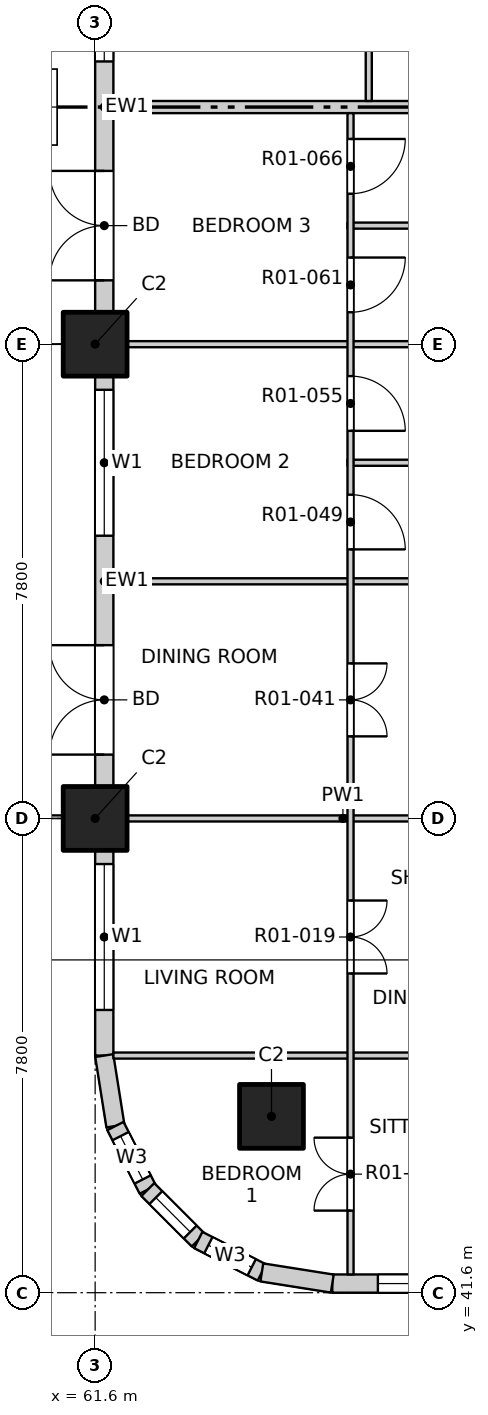
"""IFC4 building model, lengths in metres.
Left out: names, types, materials, properties, quantities, classifications, styles, units other than length and angle.
Written with IfcOpenShell. Run it as: python <this file> out.ifc"""

import sys

from ifc_helpers import new_model, si_unit, direction, frame, frame_2d, origin, origin_2d, place, context, subcontext, project, spatial, rectangle, extrude, element, fill, save


model = new_model("IFC4")
c1 = context("Model", 3, precision=1e-05, world=origin(), true_north=direction((0.0, 1.0)))
c2 = subcontext(c1, "Body", "Model", "MODEL_VIEW")
j1 = project(units=[si_unit("LENGTHUNIT", "METRE"), si_unit("PLANEANGLEUNIT", "RADIAN")], contexts=[c1])
p1 = place(None, origin())
s1 = spatial("IfcSite", under=j1, at=p1, CompositionType="ELEMENT")
p2 = place(p1, origin())
s2 = spatial("IfcBuilding", under=s1, at=p2, CompositionType="ELEMENT")
p3 = place(p2, frame((0.0, 0.0, 19.5)))
s3 = spatial("IfcBuildingStorey", under=s2, at=p3, CompositionType="ELEMENT", Elevation=19.5)
for number, where, z_axis, x_axis in (
    (1, (64.5, 44.5, -0.25), (0.0, 0.0, 1.0), (1.0, 0.0, 0.0)),
    (2, (61.6, 49.4, -0.25), (0.0, 0.0, 1.0), (1.0, 0.0, 0.0)),
    (3, (61.6, 57.2, -0.25), (0.0, 0.0, 1.0), (1.0, 0.0, 0.0)),
):
    element("IfcColumn", number, at=place(p3, frame(where, z_axis=z_axis, x_axis=x_axis)), inside=s3, PredefinedType="COLUMN", context=c2, shape_type="SweptSolid", body=[
        extrude(rectangle(XDim=1.05, YDim=1.05, at=origin_2d()), origin(), (0.0, 0.0, 1.0), 3.4),
    ])
p4 = place(p3, frame((65.5, 41.75, 0.0), z_axis=(0.0, 0.0, 1.0), x_axis=(1.0, 0.0, 0.0)))
e4 = element("IfcWall", 4, at=p4, inside=s3, PredefinedType="SOLIDWALL", context=c2, shape_type="SweptSolid", body=[
    extrude(rectangle(XDim=3.375, YDim=0.3, at=frame_2d((1.688, 0.0))), origin(), (0.0, 0.0, 1.0), 2.7),
])
p5 = place(p4, frame((0.75, 0.0, 0.9)))
e5 = element("IfcOpeningElement", 5, at=p5, cuts=e4, PredefinedType="OPENING", context=c2, shape_type="SweptSolid", body=[
    extrude(rectangle(XDim=2.4, YDim=1.8, at=frame_2d((1.2, 0.9))), frame((0.0, 0.16, 0.0), z_axis=(0.0, -1.0, 0.0), x_axis=(1.0, 0.0, 0.0)), (0.0, 0.0, 1.0), 0.32),
])
p6 = place(p3, frame((61.75, 45.5, 0.0), z_axis=(0.0, 0.0, 1.0), x_axis=(0.0, 1.0, 0.0)))
e6 = element("IfcWall", 6, at=p6, inside=s3, PredefinedType="SOLIDWALL", context=c2, shape_type="SweptSolid", body=[
    extrude(rectangle(XDim=3.375, YDim=0.3, at=frame_2d((1.688, 0.0))), origin(), (0.0, 0.0, 1.0), 2.7),
])
p7 = place(p6, frame((0.75, 0.0, 0.9)))
e7 = element("IfcOpeningElement", 7, at=p7, cuts=e6, PredefinedType="OPENING", context=c2, shape_type="SweptSolid", body=[
    extrude(rectangle(XDim=2.4, YDim=1.8, at=frame_2d((1.2, 0.9))), frame((0.0, 0.16, 0.0), z_axis=(0.0, -1.0, 0.0), x_axis=(1.0, 0.0, 0.0)), (0.0, 0.0, 1.0), 0.32),
])
p8 = place(p3, frame((61.75, 49.925, 0.0), z_axis=(0.0, 0.0, 1.0), x_axis=(0.0, 1.0, 0.0)))
e8 = element("IfcWall", 8, at=p8, inside=s3, PredefinedType="SOLIDWALL", context=c2, shape_type="SweptSolid", body=[
    extrude(rectangle(XDim=6.75, YDim=0.3, at=frame_2d((3.375, 0.0))), origin(), (0.0, 0.0, 1.0), 2.7),
])
p9 = place(p8, frame((0.525, 0.0, 0.0)))
e9 = element("IfcOpeningElement", 9, at=p9, cuts=e8, PredefinedType="OPENING", context=c2, shape_type="SweptSolid", body=[
    extrude(rectangle(XDim=1.8, YDim=2.4, at=frame_2d((0.9, 1.2))), frame((0.0, 0.16, 0.0), z_axis=(0.0, -1.0, 0.0), x_axis=(1.0, 0.0, 0.0)), (0.0, 0.0, 1.0), 0.32),
])
p10 = place(p8, frame((4.125, 0.0, 0.9)))
e10 = element("IfcOpeningElement", 10, at=p10, cuts=e8, PredefinedType="OPENING", context=c2, shape_type="SweptSolid", body=[
    extrude(rectangle(XDim=2.4, YDim=1.8, at=frame_2d((1.2, 0.9))), frame((0.0, 0.16, 0.0), z_axis=(0.0, -1.0, 0.0), x_axis=(1.0, 0.0, 0.0)), (0.0, 0.0, 1.0), 0.32),
])
p11 = place(p3, frame((61.75, 57.725, 0.0), z_axis=(0.0, 0.0, 1.0), x_axis=(0.0, 1.0, 0.0)))
e11 = element("IfcWall", 11, at=p11, inside=s3, PredefinedType="SOLIDWALL", context=c2, shape_type="SweptSolid", body=[
    extrude(rectangle(XDim=6.75, YDim=0.3, at=frame_2d((3.375, 0.0))), origin(), (0.0, 0.0, 1.0), 2.7),
])
p12 = place(p11, frame((0.525, 0.0, 0.0)))
e12 = element("IfcOpeningElement", 12, at=p12, cuts=e11, PredefinedType="OPENING", context=c2, shape_type="SweptSolid", body=[
    extrude(rectangle(XDim=1.8, YDim=2.4, at=frame_2d((0.9, 1.2))), frame((0.0, 0.16, 0.0), z_axis=(0.0, -1.0, 0.0), x_axis=(1.0, 0.0, 0.0)), (0.0, 0.0, 1.0), 0.32),
])
p13 = place(p11, frame((4.125, 0.0, 0.9)))
e13 = element("IfcOpeningElement", 13, at=p13, cuts=e11, PredefinedType="OPENING", context=c2, shape_type="SweptSolid", body=[
    extrude(rectangle(XDim=2.4, YDim=1.8, at=frame_2d((1.2, 0.9))), frame((0.0, 0.16, 0.0), z_axis=(0.0, -1.0, 0.0), x_axis=(1.0, 0.0, 0.0)), (0.0, 0.0, 1.0), 0.32),
])
p14 = place(p3, frame((61.75, 45.5, 0.0), z_axis=(0.0, 0.0, 1.0), x_axis=(0.156496880861, -0.987678452879, 0.0)))
e14 = element("IfcWall", 14, at=p14, inside=s3, PredefinedType="SOLIDWALL", context=c2, shape_type="SweptSolid", body=[
    extrude(rectangle(XDim=1.173, YDim=0.3, at=frame_2d((0.586, 0.0))), origin(), (0.0, 0.0, 1.0), 2.7),
])
p15 = place(p3, frame((61.934, 44.341, 0.0), z_axis=(0.0, 0.0, 1.0), x_axis=(0.454025524128, -0.890988677504, 0.0)))
e15 = element("IfcWall", 15, at=p15, inside=s3, PredefinedType="SOLIDWALL", context=c2, shape_type="SweptSolid", body=[
    extrude(rectangle(XDim=1.173, YDim=0.3, at=frame_2d((0.587, 0.0))), origin(), (0.0, 0.0, 1.0), 2.7),
])
p16 = place(p15, frame((0.187, 0.0, 0.9)))
e16 = element("IfcOpeningElement", 16, at=p16, cuts=e15, PredefinedType="OPENING", context=c2, shape_type="SweptSolid", body=[
    extrude(rectangle(XDim=0.8, YDim=1.2, at=frame_2d((0.4, 0.6))), frame((0.0, 0.16, 0.0), z_axis=(0.0, -1.0, 0.0), x_axis=(1.0, 0.0, 0.0)), (0.0, 0.0, 1.0), 0.32),
])
p17 = place(p3, frame((62.466, 43.296, 0.0), z_axis=(0.0, 0.0, 1.0), x_axis=(0.707106781187, -0.707106781187, 0.0)))
e17 = element("IfcWall", 17, at=p17, inside=s3, PredefinedType="SOLIDWALL", context=c2, shape_type="SweptSolid", body=[
    extrude(rectangle(XDim=1.173, YDim=0.3, at=frame_2d((0.586, 0.0))), origin(), (0.0, 0.0, 1.0), 2.7),
])
p18 = place(p17, frame((0.187, 0.0, 0.9)))
e18 = element("IfcOpeningElement", 18, at=p18, cuts=e17, PredefinedType="OPENING", context=c2, shape_type="SweptSolid", body=[
    extrude(rectangle(XDim=0.8, YDim=1.2, at=frame_2d((0.4, 0.6))), frame((0.0, 0.16, 0.0), z_axis=(0.0, -1.0, 0.0), x_axis=(1.0, 0.0, 0.0)), (0.0, 0.0, 1.0), 0.32),
])
p19 = place(p3, frame((63.296, 42.466, 0.0), z_axis=(0.0, 0.0, 1.0), x_axis=(0.890988677504, -0.454025524128, 0.0)))
e19 = element("IfcWall", 19, at=p19, inside=s3, PredefinedType="SOLIDWALL", context=c2, shape_type="SweptSolid", body=[
    extrude(rectangle(XDim=1.173, YDim=0.3, at=frame_2d((0.587, 0.0))), origin(), (0.0, 0.0, 1.0), 2.7),
])
p20 = place(p19, frame((0.187, 0.0, 0.9)))
e20 = element("IfcOpeningElement", 20, at=p20, cuts=e19, PredefinedType="OPENING", context=c2, shape_type="SweptSolid", body=[
    extrude(rectangle(XDim=0.8, YDim=1.2, at=frame_2d((0.4, 0.6))), frame((0.0, 0.16, 0.0), z_axis=(0.0, -1.0, 0.0), x_axis=(1.0, 0.0, 0.0)), (0.0, 0.0, 1.0), 0.32),
])
p21 = place(p3, frame((64.341, 41.934, 0.0), z_axis=(0.0, 0.0, 1.0), x_axis=(0.987678452879, -0.156496880861, 0.0)))
e21 = element("IfcWall", 21, at=p21, inside=s3, PredefinedType="SOLIDWALL", context=c2, shape_type="SweptSolid", body=[
    extrude(rectangle(XDim=1.173, YDim=0.3, at=frame_2d((0.586, 0.0))), origin(), (0.0, 0.0, 1.0), 2.7),
])
p22 = place(p3, frame((61.9, 45.5, 0.0), z_axis=(0.0, 0.0, 1.0), x_axis=(1.0, 0.0, 0.0)))
e22 = element("IfcWall", 22, at=p22, inside=s3, PredefinedType="PARTITIONING", context=c2, shape_type="SweptSolid", body=[
    extrude(rectangle(XDim=11.5, YDim=0.1, at=frame_2d((5.75, 0.0))), origin(), (0.0, 0.0, 1.0), 3.15),
])
p23 = place(p22, frame((7.965, 0.0, 0.0)))
e23 = element("IfcOpeningElement", 23, at=p23, cuts=e22, PredefinedType="OPENING", context=c2, shape_type="SweptSolid", body=[
    extrude(rectangle(XDim=0.9, YDim=2.1, at=frame_2d((0.45, 1.05))), frame((0.0, 0.06, 0.0), z_axis=(0.0, -1.0, 0.0), x_axis=(1.0, 0.0, 0.0)), (0.0, 0.0, 1.0), 0.12),
])
p24 = place(p3, frame((61.9, 49.4, 0.0), z_axis=(0.0, 0.0, 1.0), x_axis=(1.0, 0.0, 0.0)))
e24 = element("IfcWall", 24, at=p24, inside=s3, PredefinedType="PARTITIONING", context=c2, shape_type="SweptSolid", body=[
    extrude(rectangle(XDim=7.55, YDim=0.1, at=frame_2d((3.775, 0.0))), origin(), (0.0, 0.0, 1.0), 2.55),
])
p25 = place(p3, frame((61.9, 53.3, 0.0), z_axis=(0.0, 0.0, 1.0), x_axis=(1.0, 0.0, 0.0)))
e25 = element("IfcWall", 25, at=p25, inside=s3, PredefinedType="PARTITIONING", context=c2, shape_type="SweptSolid", body=[
    extrude(rectangle(XDim=7.55, YDim=0.1, at=frame_2d((3.775, 0.0))), origin(), (0.0, 0.0, 1.0), 3.15),
])
p26 = place(p3, frame((65.75, 55.25, 0.0), z_axis=(0.0, 0.0, 1.0), x_axis=(1.0, 0.0, 0.0)))
e26 = element("IfcWall", 26, at=p26, inside=s3, PredefinedType="PARTITIONING", context=c2, shape_type="SweptSolid", body=[
    extrude(rectangle(XDim=3.7, YDim=0.1, at=frame_2d((1.85, 0.0))), origin(), (0.0, 0.0, 1.0), 3.15),
])
p27 = place(p3, frame((61.9, 57.2, 0.0), z_axis=(0.0, 0.0, 1.0), x_axis=(1.0, 0.0, 0.0)))
e27 = element("IfcWall", 27, at=p27, inside=s3, PredefinedType="PARTITIONING", context=c2, shape_type="SweptSolid", body=[
    extrude(rectangle(XDim=7.55, YDim=0.1, at=frame_2d((3.775, 0.0))), origin(), (0.0, 0.0, 1.0), 2.55),
])
p28 = place(p3, frame((65.75, 59.15, 0.0), z_axis=(0.0, 0.0, 1.0), x_axis=(1.0, 0.0, 0.0)))
e28 = element("IfcWall", 28, at=p28, inside=s3, PredefinedType="PARTITIONING", context=c2, shape_type="SweptSolid", body=[
    extrude(rectangle(XDim=3.7, YDim=0.1, at=frame_2d((1.85, 0.0))), origin(), (0.0, 0.0, 1.0), 3.15),
])
p29 = place(p3, frame((61.9, 61.1, 0.0), z_axis=(0.0, 0.0, 1.0), x_axis=(1.0, 0.0, 0.0)))
e29 = element("IfcWall", 29, at=p29, inside=s3, PredefinedType="PARTITIONING", context=c2, shape_type="SweptSolid", body=[
    extrude(rectangle(XDim=11.5, YDim=0.2, at=frame_2d((5.75, 0.0))), origin(), (0.0, 0.0, 1.0), 3.15),
])
p30 = place(p3, frame((65.8, 41.9, 0.0), z_axis=(0.0, 0.0, 1.0), x_axis=(0.0, 1.0, 0.0)))
e30 = element("IfcWall", 30, at=p30, inside=s3, PredefinedType="PARTITIONING", context=c2, shape_type="SweptSolid", body=[
    extrude(rectangle(XDim=19.1, YDim=0.1, at=frame_2d((9.55, 0.0))), origin(), (0.0, 0.0, 1.0), 3.15),
])
p31 = place(p30, frame((1.05, 0.0, 0.0)))
e31 = element("IfcOpeningElement", 31, at=p31, cuts=e30, PredefinedType="OPENING", context=c2, shape_type="SweptSolid", body=[
    extrude(rectangle(XDim=1.2, YDim=2.1, at=frame_2d((0.6, 1.05))), frame((0.0, 0.06, 0.0), z_axis=(0.0, -1.0, 0.0), x_axis=(1.0, 0.0, 0.0)), (0.0, 0.0, 1.0), 0.12),
])
p32 = place(p30, frame((4.95, 0.0, 0.0)))
e32 = element("IfcOpeningElement", 32, at=p32, cuts=e30, PredefinedType="OPENING", context=c2, shape_type="SweptSolid", body=[
    extrude(rectangle(XDim=1.2, YDim=2.1, at=frame_2d((0.6, 1.05))), frame((0.0, 0.06, 0.0), z_axis=(0.0, -1.0, 0.0), x_axis=(1.0, 0.0, 0.0)), (0.0, 0.0, 1.0), 0.12),
])
p33 = place(p30, frame((8.85, 0.0, 0.0)))
e33 = element("IfcOpeningElement", 33, at=p33, cuts=e30, PredefinedType="OPENING", context=c2, shape_type="SweptSolid", body=[
    extrude(rectangle(XDim=1.2, YDim=2.1, at=frame_2d((0.6, 1.05))), frame((0.0, 0.06, 0.0), z_axis=(0.0, -1.0, 0.0), x_axis=(1.0, 0.0, 0.0)), (0.0, 0.0, 1.0), 0.12),
])
p34 = place(p30, frame((11.925, 0.0, 0.0)))
e34 = element("IfcOpeningElement", 34, at=p34, cuts=e30, PredefinedType="OPENING", context=c2, shape_type="SweptSolid", body=[
    extrude(rectangle(XDim=0.9, YDim=2.1, at=frame_2d((0.45, 1.05))), frame((0.0, 0.06, 0.0), z_axis=(0.0, -1.0, 0.0), x_axis=(1.0, 0.0, 0.0)), (0.0, 0.0, 1.0), 0.12),
])
p35 = place(p30, frame((13.875, 0.0, 0.0)))
e35 = element("IfcOpeningElement", 35, at=p35, cuts=e30, PredefinedType="OPENING", context=c2, shape_type="SweptSolid", body=[
    extrude(rectangle(XDim=0.9, YDim=2.1, at=frame_2d((0.45, 1.05))), frame((0.0, 0.06, 0.0), z_axis=(0.0, -1.0, 0.0), x_axis=(1.0, 0.0, 0.0)), (0.0, 0.0, 1.0), 0.12),
])
p36 = place(p30, frame((15.825, 0.0, 0.0)))
e36 = element("IfcOpeningElement", 36, at=p36, cuts=e30, PredefinedType="OPENING", context=c2, shape_type="SweptSolid", body=[
    extrude(rectangle(XDim=0.9, YDim=2.1, at=frame_2d((0.45, 1.05))), frame((0.0, 0.06, 0.0), z_axis=(0.0, -1.0, 0.0), x_axis=(1.0, 0.0, 0.0)), (0.0, 0.0, 1.0), 0.12),
])
p37 = place(p30, frame((17.775, 0.0, 0.0)))
e37 = element("IfcOpeningElement", 37, at=p37, cuts=e30, PredefinedType="OPENING", context=c2, shape_type="SweptSolid", body=[
    extrude(rectangle(XDim=0.9, YDim=2.1, at=frame_2d((0.45, 1.05))), frame((0.0, 0.06, 0.0), z_axis=(0.0, -1.0, 0.0), x_axis=(1.0, 0.0, 0.0)), (0.0, 0.0, 1.0), 0.12),
])
p38 = place(p3, frame((66.1, 61.2, 0.0), z_axis=(0.0, 0.0, 1.0), x_axis=(0.0, 1.0, 0.0)))
e38 = element("IfcWall", 38, at=p38, inside=s3, PredefinedType="PARTITIONING", context=c2, shape_type="SweptSolid", body=[
    extrude(rectangle(XDim=7.6, YDim=0.1, at=frame_2d((3.8, 0.0))), origin(), (0.0, 0.0, 1.0), 3.15),
])
p39 = place(p38, frame((1.25, 0.0, 0.0)))
e39 = element("IfcOpeningElement", 39, at=p39, cuts=e38, PredefinedType="OPENING", context=c2, shape_type="SweptSolid", body=[
    extrude(rectangle(XDim=1.2, YDim=2.1, at=frame_2d((0.6, 1.05))), frame((0.0, 0.06, 0.0), z_axis=(0.0, -1.0, 0.0), x_axis=(1.0, 0.0, 0.0)), (0.0, 0.0, 1.0), 0.12),
])
p40 = place(p38, frame((4.325, 0.0, 0.0)))
e40 = element("IfcOpeningElement", 40, at=p40, cuts=e38, PredefinedType="OPENING", context=c2, shape_type="SweptSolid", body=[
    extrude(rectangle(XDim=0.9, YDim=2.1, at=frame_2d((0.45, 1.05))), frame((0.0, 0.06, 0.0), z_axis=(0.0, -1.0, 0.0), x_axis=(1.0, 0.0, 0.0)), (0.0, 0.0, 1.0), 0.12),
])
p41 = place(p38, frame((6.275, 0.0, 0.0)))
e41 = element("IfcOpeningElement", 41, at=p41, cuts=e38, PredefinedType="OPENING", context=c2, shape_type="SweptSolid", body=[
    extrude(rectangle(XDim=0.9, YDim=2.1, at=frame_2d((0.45, 1.05))), frame((0.0, 0.06, 0.0), z_axis=(0.0, -1.0, 0.0), x_axis=(1.0, 0.0, 0.0)), (0.0, 0.0, 1.0), 0.12),
])
p42 = place(p5, origin())
e42 = element("IfcWindow", 42, at=p42, inside=s3, PartitioningType="DOUBLE_PANEL_VERTICAL", PredefinedType="WINDOW", context=c2, shape_type="SweptSolid", body=[
    extrude(rectangle(XDim=2.4, YDim=1.8, at=frame_2d((1.2, 0.9))), frame((0.0, 0.03, 0.0), z_axis=(0.0, -1.0, 0.0), x_axis=(1.0, 0.0, 0.0)), (0.0, 0.0, 1.0), 0.06),
])
fill(e5, e42)
p43 = place(p7, origin())
e43 = element("IfcWindow", 43, at=p43, inside=s3, PartitioningType="DOUBLE_PANEL_VERTICAL", PredefinedType="WINDOW", context=c2, shape_type="SweptSolid", body=[
    extrude(rectangle(XDim=2.4, YDim=1.8, at=frame_2d((1.2, 0.9))), frame((0.0, 0.03, 0.0), z_axis=(0.0, -1.0, 0.0), x_axis=(1.0, 0.0, 0.0)), (0.0, 0.0, 1.0), 0.06),
])
fill(e7, e43)
p44 = place(p9, origin())
e44 = element("IfcDoor", 44, at=p44, inside=s3, OperationType="DOUBLE_DOOR_SINGLE_SWING", PredefinedType="DOOR", context=c2, shape_type="SweptSolid", body=[
    extrude(rectangle(XDim=1.8, YDim=2.4, at=frame_2d((0.9, 1.2))), frame((0.0, 0.025, 0.0), z_axis=(0.0, -1.0, 0.0), x_axis=(1.0, 0.0, 0.0)), (0.0, 0.0, 1.0), 0.05),
])
fill(e9, e44)
p45 = place(p10, origin())
e45 = element("IfcWindow", 45, at=p45, inside=s3, PartitioningType="DOUBLE_PANEL_VERTICAL", PredefinedType="WINDOW", context=c2, shape_type="SweptSolid", body=[
    extrude(rectangle(XDim=2.4, YDim=1.8, at=frame_2d((1.2, 0.9))), frame((0.0, 0.03, 0.0), z_axis=(0.0, -1.0, 0.0), x_axis=(1.0, 0.0, 0.0)), (0.0, 0.0, 1.0), 0.06),
])
fill(e10, e45)
p46 = place(p12, origin())
e46 = element("IfcDoor", 46, at=p46, inside=s3, OperationType="DOUBLE_DOOR_SINGLE_SWING", PredefinedType="DOOR", context=c2, shape_type="SweptSolid", body=[
    extrude(rectangle(XDim=1.8, YDim=2.4, at=frame_2d((0.9, 1.2))), frame((0.0, 0.025, 0.0), z_axis=(0.0, -1.0, 0.0), x_axis=(1.0, 0.0, 0.0)), (0.0, 0.0, 1.0), 0.05),
])
fill(e12, e46)
p47 = place(p13, origin())
e47 = element("IfcWindow", 47, at=p47, inside=s3, PartitioningType="DOUBLE_PANEL_VERTICAL", PredefinedType="WINDOW", context=c2, shape_type="SweptSolid", body=[
    extrude(rectangle(XDim=2.4, YDim=1.8, at=frame_2d((1.2, 0.9))), frame((0.0, 0.03, 0.0), z_axis=(0.0, -1.0, 0.0), x_axis=(1.0, 0.0, 0.0)), (0.0, 0.0, 1.0), 0.06),
])
fill(e13, e47)
p48 = place(p16, origin())
e48 = element("IfcWindow", 48, at=p48, inside=s3, PartitioningType="SINGLE_PANEL", PredefinedType="WINDOW", context=c2, shape_type="SweptSolid", body=[
    extrude(rectangle(XDim=0.8, YDim=1.2, at=frame_2d((0.4, 0.6))), frame((0.0, 0.03, 0.0), z_axis=(0.0, -1.0, 0.0), x_axis=(1.0, 0.0, 0.0)), (0.0, 0.0, 1.0), 0.06),
])
fill(e16, e48)
p49 = place(p18, origin())
e49 = element("IfcWindow", 49, at=p49, inside=s3, PartitioningType="SINGLE_PANEL", PredefinedType="WINDOW", context=c2, shape_type="SweptSolid", body=[
    extrude(rectangle(XDim=0.8, YDim=1.2, at=frame_2d((0.4, 0.6))), frame((0.0, 0.03, 0.0), z_axis=(0.0, -1.0, 0.0), x_axis=(1.0, 0.0, 0.0)), (0.0, 0.0, 1.0), 0.06),
])
fill(e18, e49)
p50 = place(p20, origin())
e50 = element("IfcWindow", 50, at=p50, inside=s3, PartitioningType="SINGLE_PANEL", PredefinedType="WINDOW", context=c2, shape_type="SweptSolid", body=[
    extrude(rectangle(XDim=0.8, YDim=1.2, at=frame_2d((0.4, 0.6))), frame((0.0, 0.03, 0.0), z_axis=(0.0, -1.0, 0.0), x_axis=(1.0, 0.0, 0.0)), (0.0, 0.0, 1.0), 0.06),
])
fill(e20, e50)
p51 = place(p31, origin())
e51 = element("IfcDoor", 51, at=p51, inside=s3, OperationType="DOUBLE_DOOR_SINGLE_SWING", PredefinedType="DOOR", context=c2, shape_type="SweptSolid", body=[
    extrude(rectangle(XDim=1.2, YDim=2.1, at=frame_2d((0.6, 1.05))), frame((0.0, 0.025, 0.0), z_axis=(0.0, -1.0, 0.0), x_axis=(1.0, 0.0, 0.0)), (0.0, 0.0, 1.0), 0.05),
])
fill(e31, e51)
p52 = place(p32, origin())
e52 = element("IfcDoor", 52, at=p52, inside=s3, OperationType="DOUBLE_DOOR_SINGLE_SWING", PredefinedType="DOOR", context=c2, shape_type="SweptSolid", body=[
    extrude(rectangle(XDim=1.2, YDim=2.1, at=frame_2d((0.6, 1.05))), frame((0.0, 0.025, 0.0), z_axis=(0.0, -1.0, 0.0), x_axis=(1.0, 0.0, 0.0)), (0.0, 0.0, 1.0), 0.05),
])
fill(e32, e52)
p53 = place(p33, origin())
e53 = element("IfcDoor", 53, at=p53, inside=s3, OperationType="DOUBLE_DOOR_SINGLE_SWING", PredefinedType="DOOR", context=c2, shape_type="SweptSolid", body=[
    extrude(rectangle(XDim=1.2, YDim=2.1, at=frame_2d((0.6, 1.05))), frame((0.0, 0.025, 0.0), z_axis=(0.0, -1.0, 0.0), x_axis=(1.0, 0.0, 0.0)), (0.0, 0.0, 1.0), 0.05),
])
fill(e33, e53)
p54 = place(p34, origin())
e54 = element("IfcDoor", 54, at=p54, inside=s3, OperationType="SINGLE_SWING_RIGHT", PredefinedType="DOOR", context=c2, shape_type="SweptSolid", body=[
    extrude(rectangle(XDim=0.9, YDim=2.1, at=frame_2d((0.45, 1.05))), frame((0.0, 0.025, 0.0), z_axis=(0.0, -1.0, 0.0), x_axis=(1.0, 0.0, 0.0)), (0.0, 0.0, 1.0), 0.05),
])
fill(e34, e54)
p55 = place(p35, origin())
e55 = element("IfcDoor", 55, at=p55, inside=s3, OperationType="SINGLE_SWING_RIGHT", PredefinedType="DOOR", context=c2, shape_type="SweptSolid", body=[
    extrude(rectangle(XDim=0.9, YDim=2.1, at=frame_2d((0.45, 1.05))), frame((0.0, 0.025, 0.0), z_axis=(0.0, -1.0, 0.0), x_axis=(1.0, 0.0, 0.0)), (0.0, 0.0, 1.0), 0.05),
])
fill(e35, e55)
p56 = place(p36, origin())
e56 = element("IfcDoor", 56, at=p56, inside=s3, OperationType="SINGLE_SWING_LEFT", PredefinedType="DOOR", context=c2, shape_type="SweptSolid", body=[
    extrude(rectangle(XDim=0.9, YDim=2.1, at=frame_2d((0.45, 1.05))), frame((0.0, 0.025, 0.0), z_axis=(0.0, -1.0, 0.0), x_axis=(1.0, 0.0, 0.0)), (0.0, 0.0, 1.0), 0.05),
])
fill(e36, e56)
p57 = place(p37, origin())
e57 = element("IfcDoor", 57, at=p57, inside=s3, OperationType="SINGLE_SWING_LEFT", PredefinedType="DOOR", context=c2, shape_type="SweptSolid", body=[
    extrude(rectangle(XDim=0.9, YDim=2.1, at=frame_2d((0.45, 1.05))), frame((0.0, 0.025, 0.0), z_axis=(0.0, -1.0, 0.0), x_axis=(1.0, 0.0, 0.0)), (0.0, 0.0, 1.0), 0.05),
])
fill(e37, e57)
save(model, sys.argv[1])
